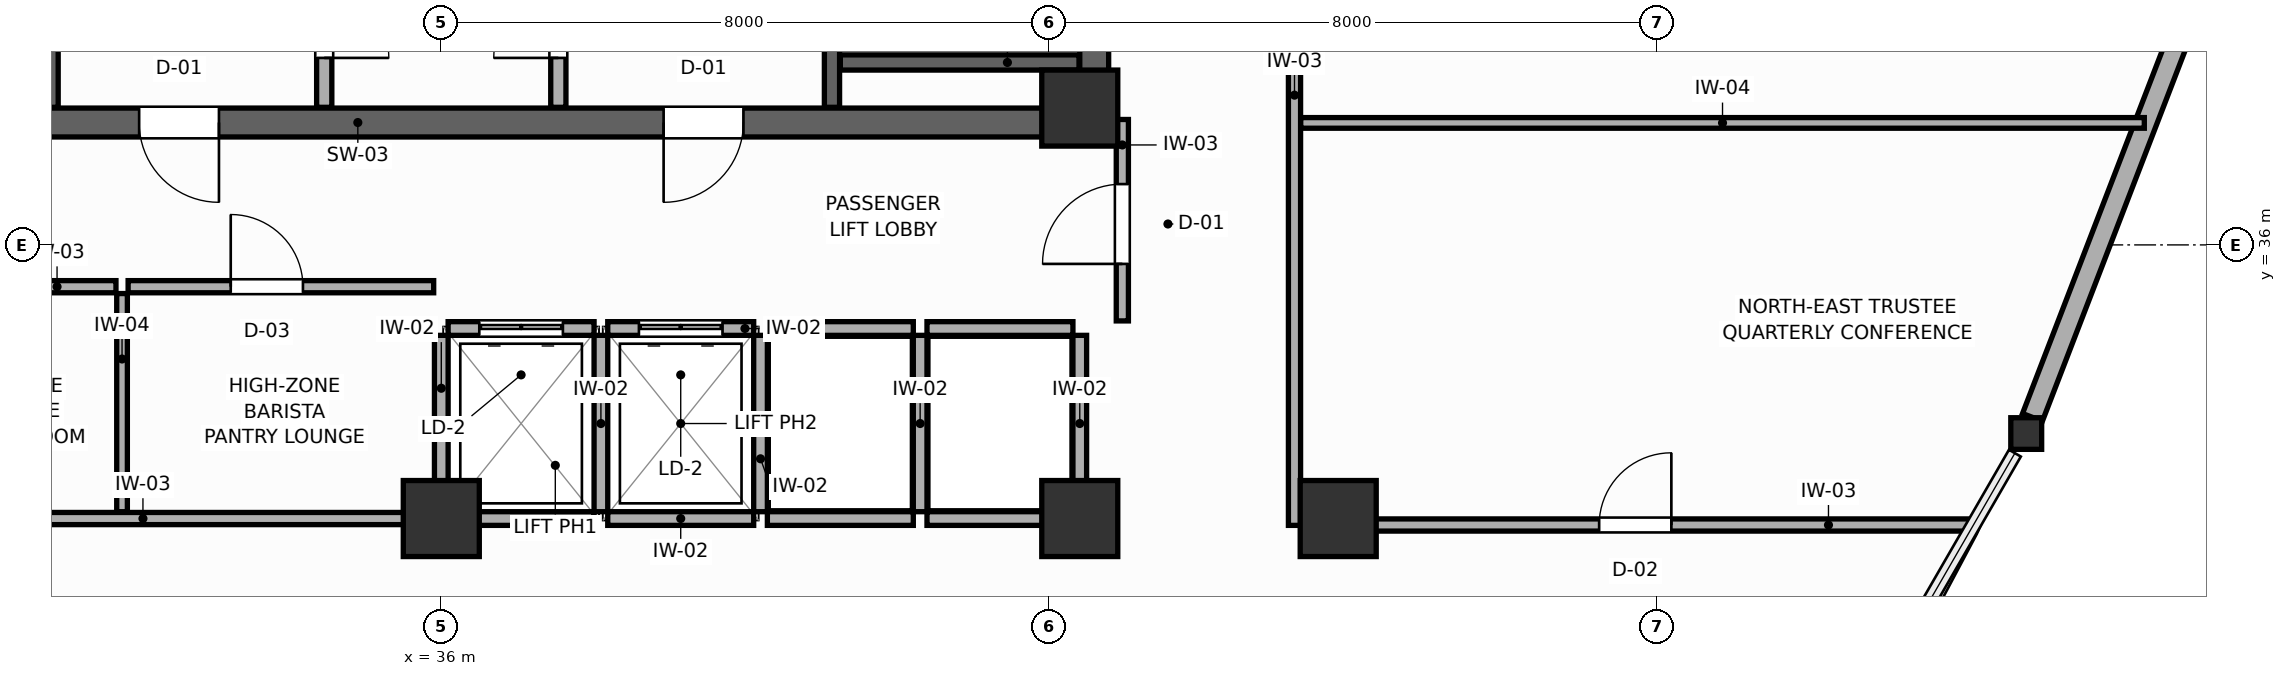
"""IFC4 building model, lengths in metres.
Left out: names, types, materials, properties, quantities, classifications, styles, units other than length and angle.
Written with IfcOpenShell. Run it as: python <this file> out.ifc"""

import sys

from ifc_helpers import new_model, si_unit, direction, frame, frame_2d, origin, origin_2d, place, context, subcontext, project, spatial, rectangle, i_section, extrude, source, transform, mapped, element, fill, save


model = new_model("IFC4")
c1 = context("Model", 3, precision=1e-05, world=origin(), true_north=direction((0.0, 1.0)))
c2 = subcontext(c1, "Body", "Model", "MODEL_VIEW")
j1 = project(units=[si_unit("LENGTHUNIT", "METRE"), si_unit("PLANEANGLEUNIT", "RADIAN")], contexts=[c1])
p1 = place(None, origin())
s1 = spatial("IfcSite", under=j1, at=p1, CompositionType="ELEMENT")
p2 = place(p1, origin())
s2 = spatial("IfcBuilding", under=s1, at=p2, CompositionType="ELEMENT")
p3 = place(p2, frame((0.0, 0.0, 213.0)))
s3 = spatial("IfcBuildingStorey", under=s2, at=p3, CompositionType="ELEMENT", Elevation=213.0)
p4 = place(p3, frame((27.22, 37.61, 0.0), z_axis=(0.0, 0.0, 1.0), x_axis=(1.0, 0.0, 0.0)))
e1 = element("IfcWall", 1, at=p4, inside=s3, PredefinedType="SHEAR", context=c2, shape_type="SweptSolid", body=[
    extrude(rectangle(XDim=17.56, YDim=0.38, at=frame_2d((8.78, 0.0))), origin(), (0.0, 0.0, 1.0), 3.6),
])
p5 = place(p4, frame((4.805, 0.0, 0.0)))
e2 = element("IfcOpeningElement", 2, at=p5, cuts=e1, PredefinedType="OPENING", context=c2, shape_type="SweptSolid", body=[
    extrude(rectangle(XDim=1.05, YDim=2.1, at=frame_2d((0.525, 1.05))), frame((0.0, 0.2, 0.0), z_axis=(0.0, -1.0, 0.0), x_axis=(1.0, 0.0, 0.0)), (0.0, 0.0, 1.0), 0.4),
])
p6 = place(p4, frame((11.705, 0.0, 0.0)))
e3 = element("IfcOpeningElement", 3, at=p6, cuts=e1, PredefinedType="OPENING", context=c2, shape_type="SweptSolid", body=[
    extrude(rectangle(XDim=1.05, YDim=2.1, at=frame_2d((0.525, 1.05))), frame((0.0, 0.2, 0.0), z_axis=(0.0, -1.0, 0.0), x_axis=(1.0, 0.0, 0.0)), (0.0, 0.0, 1.0), 0.4),
])
p7 = place(p3, frame((44.59, 37.8, 0.0), z_axis=(0.0, 0.0, 1.0), x_axis=(0.0, 1.0, 0.0)))
e4 = element("IfcWall", 4, at=p7, inside=s3, PredefinedType="SHEAR", context=c2, shape_type="SweptSolid", body=[
    extrude(rectangle(XDim=9.0, YDim=0.38, at=frame_2d((4.5, 0.0))), origin(), (0.0, 0.0, 1.0), 3.6),
])
m1 = source(origin(), c2, "Body", "SweptSolid", [
    extrude(rectangle(XDim=1.0, YDim=1.0, at=origin_2d()), origin(), (0.0, 0.0, 1.0), 3.6),
])
for number, where, z_axis, x_axis in (
    (5, (44.4, 37.8, 0.0), (0.0, 0.0, 1.0), (1.0, 0.0, 0.0)),
    (6, (44.4, 32.4, 0.0), (0.0, 0.0, 1.0), (1.0, 0.0, 0.0)),
    (7, (36.0, 32.4, 0.0), (0.0, 0.0, 1.0), (1.0, 0.0, 0.0)),
    (8, (47.8, 32.4, 0.0), (0.0, 0.0, 1.0), (1.0, 0.0, 0.0)),
):
    element("IfcColumn", number, at=place(p3, frame(where, z_axis=z_axis, x_axis=x_axis)), inside=s3, PredefinedType="COLUMN", context=c2, shape_type="MappedRepresentation", body=[
        mapped(m1, transform((0.0, 0.0, 0.0), scale=1.0)),
    ])
m2 = source(origin(), c2, "Body", "SweptSolid", [
    extrude(i_section(OverallWidth=0.406, OverallDepth=0.416, WebThickness=0.027, FlangeThickness=0.044, FilletRadius=0.015, at=origin_2d()), origin(), (0.0, 0.0, 1.0), 3.6),
])
p8 = place(p3, frame((56.852, 33.518, 0.0), z_axis=(0.0, 0.0, 1.0), x_axis=(1.0, 0.0, 0.0)))
e9 = element("IfcColumn", 9, at=p8, inside=s3, PredefinedType="COLUMN", context=c2, shape_type="MappedRepresentation", body=[
    mapped(m2, transform((0.0, 0.0, 0.0), scale=1.0)),
])
p9 = place(p3, frame((56.934, 33.731, 0.0), z_axis=(0.0, 0.0, 1.0), x_axis=(0.359321962573, 0.933213655715, 0.0)))
e10 = element("IfcWall", 10, at=p9, inside=s3, PredefinedType="SOLIDWALL", context=c2, shape_type="SweptSolid", body=[
    extrude(rectangle(XDim=13.788, YDim=0.28, at=frame_2d((6.894, 0.0))), origin(), (0.0, 0.0, 1.0), 1.88),
])
p10 = place(p3, frame((30.86, 37.81, 0.0), z_axis=(0.0, 0.0, 1.0), x_axis=(0.0, 1.0, 0.0)))
e11 = element("IfcWall", 11, at=p10, inside=s3, PredefinedType="SHEAR", context=c2, shape_type="SweptSolid", body=[
    extrude(rectangle(XDim=8.98, YDim=0.2, at=frame_2d((4.49, 0.0))), origin(), (0.0, 0.0, 1.0), 3.6),
])
p11 = place(p10, frame((0.82, 0.0, 0.0)))
e12 = element("IfcOpeningElement", 12, at=p11, cuts=e11, PredefinedType="OPENING", context=c2, shape_type="SweptSolid", body=[
    extrude(rectangle(XDim=1.05, YDim=2.1, at=frame_2d((0.525, 1.05))), frame((0.0, 0.11, 0.0), z_axis=(0.0, -1.0, 0.0), x_axis=(1.0, 0.0, 0.0)), (0.0, 0.0, 1.0), 0.22),
])
p12 = place(p3, frame((41.14, 37.81, 0.0), z_axis=(0.0, 0.0, 1.0), x_axis=(0.0, 1.0, 0.0)))
e13 = element("IfcWall", 13, at=p12, inside=s3, PredefinedType="SHEAR", context=c2, shape_type="SweptSolid", body=[
    extrude(rectangle(XDim=8.98, YDim=0.2, at=frame_2d((4.49, 0.0))), origin(), (0.0, 0.0, 1.0), 3.6),
])
p13 = place(p12, frame((0.82, 0.0, 0.0)))
e14 = element("IfcOpeningElement", 14, at=p13, cuts=e13, PredefinedType="OPENING", context=c2, shape_type="SweptSolid", body=[
    extrude(rectangle(XDim=1.05, YDim=2.1, at=frame_2d((0.525, 1.05))), frame((0.0, 0.11, 0.0), z_axis=(0.0, -1.0, 0.0), x_axis=(1.0, 0.0, 0.0)), (0.0, 0.0, 1.0), 0.22),
])
p14 = place(p3, frame((41.25, 38.4, 0.0), z_axis=(0.0, 0.0, 1.0), x_axis=(1.0, 0.0, 0.0)))
e15 = element("IfcWall", 15, at=p14, inside=s3, PredefinedType="SHEAR", context=c2, shape_type="SweptSolid", body=[
    extrude(rectangle(XDim=3.14, YDim=0.2, at=frame_2d((1.57, 0.0))), origin(), (0.0, 0.0, 1.0), 3.6),
])
p15 = place(p3, frame((34.46, 37.81, 0.0), z_axis=(0.0, 0.0, 1.0), x_axis=(0.0, 1.0, 0.0)))
e16 = element("IfcWall", 16, at=p15, inside=s3, PredefinedType="PARTITIONING", context=c2, shape_type="SweptSolid", body=[
    extrude(rectangle(XDim=8.98, YDim=0.2, at=frame_2d((4.49, 0.0))), origin(), (0.0, 0.0, 1.0), 3.41),
])
p16 = place(p15, frame((0.65, 0.0, 0.0)))
e17 = element("IfcOpeningElement", 17, at=p16, cuts=e16, PredefinedType="OPENING", context=c2, shape_type="SweptSolid", body=[
    extrude(rectangle(XDim=0.85, YDim=2.05, at=frame_2d((0.425, 1.025))), frame((0.0, 0.11, 0.0), z_axis=(0.0, -1.0, 0.0), x_axis=(1.0, 0.0, 0.0)), (0.0, 0.0, 1.0), 0.22),
])
p17 = place(p3, frame((37.54, 37.81, 0.0), z_axis=(0.0, 0.0, 1.0), x_axis=(0.0, 1.0, 0.0)))
e18 = element("IfcWall", 18, at=p17, inside=s3, PredefinedType="PARTITIONING", context=c2, shape_type="SweptSolid", body=[
    extrude(rectangle(XDim=8.98, YDim=0.2, at=frame_2d((4.49, 0.0))), origin(), (0.0, 0.0, 1.0), 3.41),
])
p18 = place(p17, frame((0.65, 0.0, 0.0)))
e19 = element("IfcOpeningElement", 19, at=p18, cuts=e18, PredefinedType="OPENING", context=c2, shape_type="SweptSolid", body=[
    extrude(rectangle(XDim=0.85, YDim=2.05, at=frame_2d((0.425, 1.025))), frame((0.0, 0.11, 0.0), z_axis=(0.0, -1.0, 0.0), x_axis=(1.0, 0.0, 0.0)), (0.0, 0.0, 1.0), 0.22),
])
p19 = place(p3, frame((36.09, 34.9, 0.0), z_axis=(0.0, 0.0, 1.0), x_axis=(1.0, 0.0, 0.0)))
e20 = element("IfcWall", 20, at=p19, inside=s3, PredefinedType="PARTITIONING", context=c2, shape_type="SweptSolid", body=[
    extrude(rectangle(XDim=1.92, YDim=0.18, at=frame_2d((0.96, 0.0))), origin(), (0.0, 0.0, 1.0), 3.41),
])
p20 = place(p19, frame((0.41, 0.0, 0.0)))
e21 = element("IfcOpeningElement", 21, at=p20, cuts=e20, PredefinedType="OPENING", context=c2, shape_type="SweptSolid", body=[
    extrude(rectangle(XDim=1.1, YDim=2.1, at=frame_2d((0.55, 1.05))), frame((0.0, 0.1, 0.0), z_axis=(0.0, -1.0, 0.0), x_axis=(1.0, 0.0, 0.0)), (0.0, 0.0, 1.0), 0.2),
])
p21 = place(p3, frame((36.09, 32.4, 0.0), z_axis=(0.0, 0.0, 1.0), x_axis=(1.0, 0.0, 0.0)))
e22 = element("IfcWall", 22, at=p21, inside=s3, PredefinedType="PARTITIONING", context=c2, shape_type="SweptSolid", body=[
    extrude(rectangle(XDim=1.92, YDim=0.18, at=frame_2d((0.96, 0.0))), origin(), (0.0, 0.0, 1.0), 2.17),
])
p22 = place(p3, frame((36.0, 32.49, 0.0), z_axis=(0.0, 0.0, 1.0), x_axis=(0.0, 1.0, 0.0)))
e23 = element("IfcWall", 23, at=p22, inside=s3, PredefinedType="PARTITIONING", context=c2, shape_type="SweptSolid", body=[
    extrude(rectangle(XDim=2.32, YDim=0.18, at=frame_2d((1.16, 0.0))), origin(), (0.0, 0.0, 1.0), 3.41),
])
p23 = place(p3, frame((38.19, 34.9, 0.0), z_axis=(0.0, 0.0, 1.0), x_axis=(1.0, 0.0, 0.0)))
e24 = element("IfcWall", 24, at=p23, inside=s3, PredefinedType="PARTITIONING", context=c2, shape_type="SweptSolid", body=[
    extrude(rectangle(XDim=1.92, YDim=0.18, at=frame_2d((0.96, 0.0))), origin(), (0.0, 0.0, 1.0), 3.41),
])
p24 = place(p23, frame((0.41, 0.0, 0.0)))
e25 = element("IfcOpeningElement", 25, at=p24, cuts=e24, PredefinedType="OPENING", context=c2, shape_type="SweptSolid", body=[
    extrude(rectangle(XDim=1.1, YDim=2.1, at=frame_2d((0.55, 1.05))), frame((0.0, 0.1, 0.0), z_axis=(0.0, -1.0, 0.0), x_axis=(1.0, 0.0, 0.0)), (0.0, 0.0, 1.0), 0.2),
])
p25 = place(p3, frame((38.19, 32.4, 0.0), z_axis=(0.0, 0.0, 1.0), x_axis=(1.0, 0.0, 0.0)))
e26 = element("IfcWall", 26, at=p25, inside=s3, PredefinedType="PARTITIONING", context=c2, shape_type="SweptSolid", body=[
    extrude(rectangle(XDim=1.92, YDim=0.18, at=frame_2d((0.96, 0.0))), origin(), (0.0, 0.0, 1.0), 2.17),
])
p26 = place(p3, frame((38.1, 32.49, 0.0), z_axis=(0.0, 0.0, 1.0), x_axis=(0.0, 1.0, 0.0)))
e27 = element("IfcWall", 27, at=p26, inside=s3, PredefinedType="PARTITIONING", context=c2, shape_type="SweptSolid", body=[
    extrude(rectangle(XDim=2.32, YDim=0.18, at=frame_2d((1.16, 0.0))), origin(), (0.0, 0.0, 1.0), 3.41),
])
p27 = place(p3, frame((40.29, 34.9, 0.0), z_axis=(0.0, 0.0, 1.0), x_axis=(1.0, 0.0, 0.0)))
e28 = element("IfcWall", 28, at=p27, inside=s3, PredefinedType="PARTITIONING", context=c2, shape_type="SweptSolid", body=[
    extrude(rectangle(XDim=1.92, YDim=0.18, at=frame_2d((0.96, 0.0))), origin(), (0.0, 0.0, 1.0), 3.41),
])
p28 = place(p3, frame((40.29, 32.4, 0.0), z_axis=(0.0, 0.0, 1.0), x_axis=(1.0, 0.0, 0.0)))
e29 = element("IfcWall", 29, at=p28, inside=s3, PredefinedType="PARTITIONING", context=c2, shape_type="SweptSolid", body=[
    extrude(rectangle(XDim=1.92, YDim=0.18, at=frame_2d((0.96, 0.0))), origin(), (0.0, 0.0, 1.0), 2.17),
])
p29 = place(p3, frame((40.2, 32.49, 0.0), z_axis=(0.0, 0.0, 1.0), x_axis=(0.0, 1.0, 0.0)))
e30 = element("IfcWall", 30, at=p29, inside=s3, PredefinedType="PARTITIONING", context=c2, shape_type="SweptSolid", body=[
    extrude(rectangle(XDim=2.32, YDim=0.18, at=frame_2d((1.16, 0.0))), origin(), (0.0, 0.0, 1.0), 3.41),
])
p30 = place(p3, frame((42.39, 34.9, 0.0), z_axis=(0.0, 0.0, 1.0), x_axis=(1.0, 0.0, 0.0)))
e31 = element("IfcWall", 31, at=p30, inside=s3, PredefinedType="PARTITIONING", context=c2, shape_type="SweptSolid", body=[
    extrude(rectangle(XDim=1.92, YDim=0.18, at=frame_2d((0.96, 0.0))), origin(), (0.0, 0.0, 1.0), 3.41),
])
p31 = place(p3, frame((42.39, 32.4, 0.0), z_axis=(0.0, 0.0, 1.0), x_axis=(1.0, 0.0, 0.0)))
e32 = element("IfcWall", 32, at=p31, inside=s3, PredefinedType="PARTITIONING", context=c2, shape_type="SweptSolid", body=[
    extrude(rectangle(XDim=1.92, YDim=0.18, at=frame_2d((0.96, 0.0))), origin(), (0.0, 0.0, 1.0), 2.17),
])
for number, where, z_axis, x_axis in (
    (33, (42.3, 32.49, 0.0), (0.0, 0.0, 1.0), (0.0, 1.0, 0.0)),
    (34, (44.4, 32.49, 0.0), (0.0, 0.0, 1.0), (0.0, 1.0, 0.0)),
):
    element("IfcWall", number, at=place(p3, frame(where, z_axis=z_axis, x_axis=x_axis)), inside=s3, PredefinedType="PARTITIONING", context=c2, shape_type="SweptSolid", body=[
        extrude(rectangle(XDim=2.32, YDim=0.18, at=frame_2d((1.16, 0.0))), origin(), (0.0, 0.0, 1.0), 3.41),
    ])
p32 = place(p3, frame((28.25, 32.4, 0.0), z_axis=(0.0, 0.0, 1.0), x_axis=(1.0, 0.0, 0.0)))
e35 = element("IfcWall", 35, at=p32, inside=s3, PredefinedType="PARTITIONING", context=c2, shape_type="SweptSolid", body=[
    extrude(rectangle(XDim=7.65, YDim=0.16, at=frame_2d((3.825, 0.0))), origin(), (0.0, 0.0, 1.0), 2.17),
])
p33 = place(p3, frame((31.8, 32.49, 0.0), z_axis=(0.0, 0.0, 1.0), x_axis=(0.0, 1.0, 0.0)))
e36 = element("IfcWall", 36, at=p33, inside=s3, PredefinedType="PARTITIONING", context=c2, shape_type="SweptSolid", body=[
    extrude(rectangle(XDim=2.87, YDim=0.14, at=frame_2d((1.435, 0.0))), origin(), (0.0, 0.0, 1.0), 3.41),
])
p34 = place(p3, frame((27.69, 35.45, 0.0), z_axis=(0.0, 0.0, 1.0), x_axis=(1.0, 0.0, 0.0)))
e37 = element("IfcWall", 37, at=p34, inside=s3, PredefinedType="PARTITIONING", context=c2, shape_type="SweptSolid", body=[
    extrude(rectangle(XDim=4.03, YDim=0.16, at=frame_2d((2.015, 0.0))), origin(), (0.0, 0.0, 1.0), 3.41),
])
p35 = place(p34, frame((1.35, 0.0, 0.0)))
e38 = element("IfcOpeningElement", 38, at=p35, cuts=e37, PredefinedType="OPENING", context=c2, shape_type="SweptSolid", body=[
    extrude(rectangle(XDim=0.95, YDim=2.05, at=frame_2d((0.475, 1.025))), frame((0.0, 0.09, 0.0), z_axis=(0.0, -1.0, 0.0), x_axis=(1.0, 0.0, 0.0)), (0.0, 0.0, 1.0), 0.18),
])
p36 = place(p3, frame((31.88, 35.45, 0.0), z_axis=(0.0, 0.0, 1.0), x_axis=(1.0, 0.0, 0.0)))
e39 = element("IfcWall", 39, at=p36, inside=s3, PredefinedType="PARTITIONING", context=c2, shape_type="SweptSolid", body=[
    extrude(rectangle(XDim=4.02, YDim=0.16, at=frame_2d((2.01, 0.0))), origin(), (0.0, 0.0, 1.0), 3.41),
])
p37 = place(p36, frame((1.35, 0.0, 0.0)))
e40 = element("IfcOpeningElement", 40, at=p37, cuts=e39, PredefinedType="OPENING", context=c2, shape_type="SweptSolid", body=[
    extrude(rectangle(XDim=0.95, YDim=2.05, at=frame_2d((0.475, 1.025))), frame((0.0, 0.09, 0.0), z_axis=(0.0, -1.0, 0.0), x_axis=(1.0, 0.0, 0.0)), (0.0, 0.0, 1.0), 0.18),
])
p38 = place(p3, frame((44.96, 35.0, 0.0), z_axis=(0.0, 0.0, 1.0), x_axis=(0.0, 1.0, 0.0)))
e41 = element("IfcWall", 41, at=p38, inside=s3, PredefinedType="PARTITIONING", context=c2, shape_type="SweptSolid", body=[
    extrude(rectangle(XDim=2.65, YDim=0.16, at=frame_2d((1.325, 0.0))), origin(), (0.0, 0.0, 1.0), 3.41),
])
p39 = place(p38, frame((0.75, 0.0, 0.0)))
e42 = element("IfcOpeningElement", 42, at=p39, cuts=e41, PredefinedType="OPENING", context=c2, shape_type="SweptSolid", body=[
    extrude(rectangle(XDim=1.05, YDim=2.1, at=frame_2d((0.525, 1.05))), frame((0.0, 0.09, 0.0), z_axis=(0.0, -1.0, 0.0), x_axis=(1.0, 0.0, 0.0)), (0.0, 0.0, 1.0), 0.18),
])
p40 = place(p3, frame((47.225, 32.31, 0.0), z_axis=(0.0, 0.0, 1.0), x_axis=(0.0, 1.0, 0.0)))
e43 = element("IfcWall", 43, at=p40, inside=s3, PredefinedType="PARTITIONING", context=c2, shape_type="SweptSolid", body=[
    extrude(rectangle(XDim=19.198, YDim=0.16, at=frame_2d((9.599, 0.0))), origin(), (0.0, 0.0, 1.0), 3.41),
])
p41 = place(p40, frame((11.5, 0.0, 0.0)))
e44 = element("IfcOpeningElement", 44, at=p41, cuts=e43, PredefinedType="OPENING", context=c2, shape_type="SweptSolid", body=[
    extrude(rectangle(XDim=0.95, YDim=2.05, at=frame_2d((0.475, 1.025))), frame((0.0, 0.09, 0.0), z_axis=(0.0, -1.0, 0.0), x_axis=(1.0, 0.0, 0.0)), (0.0, 0.0, 1.0), 0.18),
])
p42 = place(p3, frame((47.307, 32.315, 0.0), z_axis=(0.0, 0.0, 1.0), x_axis=(1.0, 0.0, 0.0)))
e45 = element("IfcWall", 45, at=p42, inside=s3, PredefinedType="PARTITIONING", context=c2, shape_type="SweptSolid", body=[
    extrude(rectangle(XDim=8.83, YDim=0.16, at=frame_2d((4.415, 0.0))), origin(), (0.0, 0.0, 1.0), 2.17),
])
p43 = place(p42, frame((3.926, 0.0, 0.0)))
e46 = element("IfcOpeningElement", 46, at=p43, cuts=e45, PredefinedType="OPENING", context=c2, shape_type="SweptSolid", body=[
    extrude(rectangle(XDim=0.95, YDim=2.05, at=frame_2d((0.475, 1.025))), frame((0.0, 0.09, 0.0), z_axis=(0.0, -1.0, 0.0), x_axis=(1.0, 0.0, 0.0)), (0.0, 0.0, 1.0), 0.18),
])
p44 = place(p3, frame((47.307, 37.605, 0.0), z_axis=(0.0, 0.0, 1.0), x_axis=(1.0, 0.0, 0.0)))
e47 = element("IfcWall", 47, at=p44, inside=s3, PredefinedType="PARTITIONING", context=c2, shape_type="SweptSolid", body=[
    extrude(rectangle(XDim=11.098, YDim=0.14, at=frame_2d((5.549, 0.0))), origin(), (0.0, 0.0, 1.0), 3.41),
])
p45 = place(p16, frame((0.85, 0.0, 0.0), z_axis=(0.0, 0.0, 1.0), x_axis=(-1.0, 0.0, 0.0)))
e48 = element("IfcDoor", 48, at=p45, inside=s3, OperationType="SINGLE_SWING_RIGHT", PredefinedType="DOOR", context=c2, shape_type="SweptSolid", body=[
    extrude(rectangle(XDim=0.85, YDim=2.05, at=frame_2d((0.425, 1.025))), frame((0.0, 0.025, 0.0), z_axis=(0.0, -1.0, 0.0), x_axis=(1.0, 0.0, 0.0)), (0.0, 0.0, 1.0), 0.05),
])
fill(e17, e48)
p46 = place(p18, origin())
e49 = element("IfcDoor", 49, at=p46, inside=s3, OperationType="SINGLE_SWING_LEFT", PredefinedType="DOOR", context=c2, shape_type="SweptSolid", body=[
    extrude(rectangle(XDim=0.85, YDim=2.05, at=frame_2d((0.425, 1.025))), frame((0.0, 0.025, 0.0), z_axis=(0.0, -1.0, 0.0), x_axis=(1.0, 0.0, 0.0)), (0.0, 0.0, 1.0), 0.05),
])
fill(e19, e49)
p47 = place(p20, origin())
e50 = element("IfcDoor", 50, at=p47, inside=s3, OperationType="DOUBLE_DOOR_SLIDING", PredefinedType="DOOR", context=c2, shape_type="SweptSolid", body=[
    extrude(rectangle(XDim=1.1, YDim=2.1, at=frame_2d((0.55, 1.05))), frame((0.0, 0.025, 0.0), z_axis=(0.0, -1.0, 0.0), x_axis=(1.0, 0.0, 0.0)), (0.0, 0.0, 1.0), 0.05),
])
fill(e21, e50)
p48 = place(p24, origin())
e51 = element("IfcDoor", 51, at=p48, inside=s3, OperationType="DOUBLE_DOOR_SLIDING", PredefinedType="DOOR", context=c2, shape_type="SweptSolid", body=[
    extrude(rectangle(XDim=1.1, YDim=2.1, at=frame_2d((0.55, 1.05))), frame((0.0, 0.025, 0.0), z_axis=(0.0, -1.0, 0.0), x_axis=(1.0, 0.0, 0.0)), (0.0, 0.0, 1.0), 0.05),
])
fill(e25, e51)
p49 = place(p37, origin())
e52 = element("IfcDoor", 52, at=p49, inside=s3, OperationType="SINGLE_SWING_LEFT", PredefinedType="DOOR", context=c2, shape_type="SweptSolid", body=[
    extrude(rectangle(XDim=0.95, YDim=2.05, at=frame_2d((0.475, 1.025))), frame((0.0, 0.025, 0.0), z_axis=(0.0, -1.0, 0.0), x_axis=(1.0, 0.0, 0.0)), (0.0, 0.0, 1.0), 0.05),
])
fill(e40, e52)
p50 = place(p39, origin())
e53 = element("IfcDoor", 53, at=p50, inside=s3, OperationType="SINGLE_SWING_LEFT", PredefinedType="DOOR", context=c2, shape_type="SweptSolid", body=[
    extrude(rectangle(XDim=1.05, YDim=2.1, at=frame_2d((0.525, 1.05))), frame((0.0, 0.025, 0.0), z_axis=(0.0, -1.0, 0.0), x_axis=(1.0, 0.0, 0.0)), (0.0, 0.0, 1.0), 0.05),
])
fill(e42, e53)
p51 = place(p43, origin())
e54 = element("IfcDoor", 54, at=p51, inside=s3, OperationType="SINGLE_SWING_RIGHT", PredefinedType="DOOR", context=c2, shape_type="SweptSolid", body=[
    extrude(rectangle(XDim=0.95, YDim=2.05, at=frame_2d((0.475, 1.025))), frame((0.0, 0.025, 0.0), z_axis=(0.0, -1.0, 0.0), x_axis=(1.0, 0.0, 0.0)), (0.0, 0.0, 1.0), 0.05),
])
fill(e46, e54)
p52 = place(p5, frame((1.05, 0.0, 0.0), z_axis=(0.0, 0.0, 1.0), x_axis=(-1.0, 0.0, 0.0)))
e55 = element("IfcDoor", 55, at=p52, inside=s3, OperationType="SINGLE_SWING_LEFT", PredefinedType="DOOR", context=c2, shape_type="SweptSolid", body=[
    extrude(rectangle(XDim=1.05, YDim=2.1, at=frame_2d((0.525, 1.05))), frame((0.0, 0.025, 0.0), z_axis=(0.0, -1.0, 0.0), x_axis=(1.0, 0.0, 0.0)), (0.0, 0.0, 1.0), 0.05),
])
fill(e2, e55)
p53 = place(p6, frame((1.05, 0.0, 0.0), z_axis=(0.0, 0.0, 1.0), x_axis=(-1.0, 0.0, 0.0)))
e56 = element("IfcDoor", 56, at=p53, inside=s3, OperationType="SINGLE_SWING_RIGHT", PredefinedType="DOOR", context=c2, shape_type="SweptSolid", body=[
    extrude(rectangle(XDim=1.05, YDim=2.1, at=frame_2d((0.525, 1.05))), frame((0.0, 0.025, 0.0), z_axis=(0.0, -1.0, 0.0), x_axis=(1.0, 0.0, 0.0)), (0.0, 0.0, 1.0), 0.05),
])
fill(e3, e56)
save(model, sys.argv[1])
